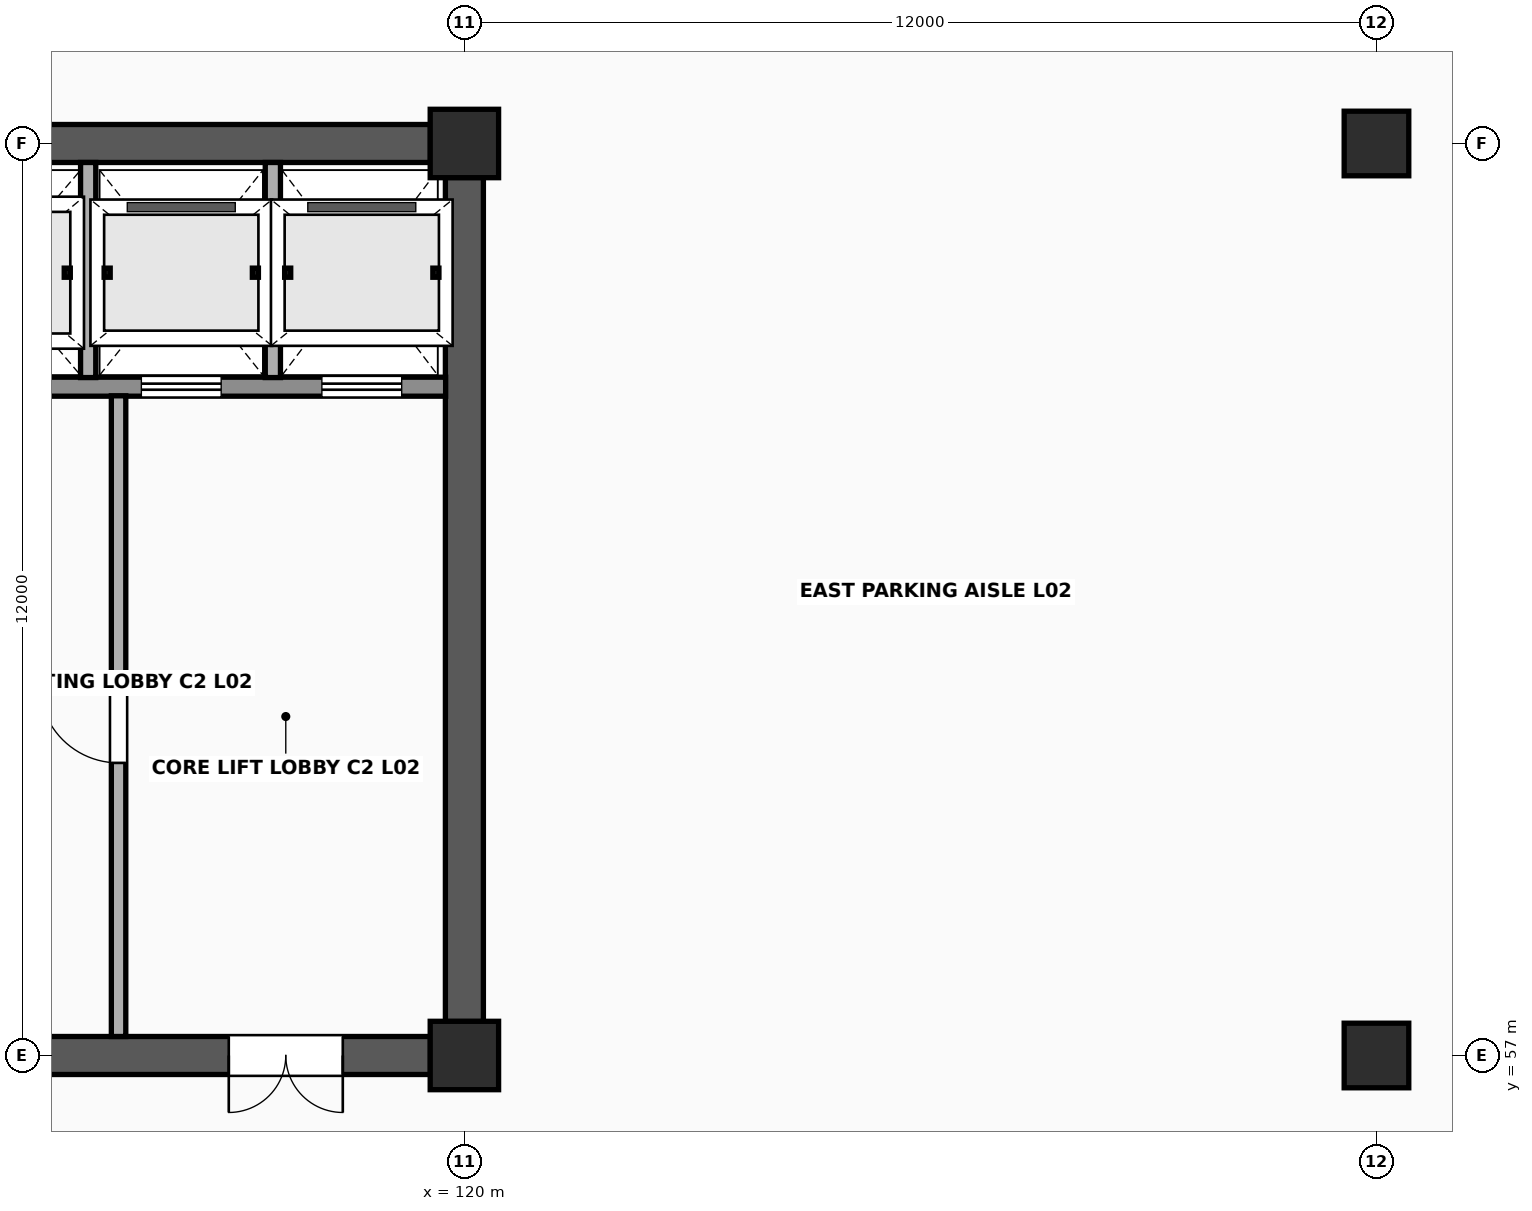
"""IFC4 building model, lengths in metres.
Left out: names, types, materials, properties, quantities, classifications, styles, units other than length and angle.
Written with IfcOpenShell. Run it as: python <this file> out.ifc"""

import sys

from ifc_helpers import new_model, si_unit, direction, frame, frame_2d, origin, origin_2d, place, context, subcontext, project, spatial, rectangle, extrude, element, fill, save


model = new_model("IFC4")
c1 = context("Model", 3, precision=1e-05, world=origin(), true_north=direction((0.0, 1.0)))
c2 = subcontext(c1, "Body", "Model", "MODEL_VIEW")
j1 = project(units=[si_unit("LENGTHUNIT", "METRE"), si_unit("PLANEANGLEUNIT", "RADIAN")], contexts=[c1])
p1 = place(None, origin())
s1 = spatial("IfcSite", under=j1, at=p1, CompositionType="ELEMENT")
p2 = place(p1, origin())
s2 = spatial("IfcBuilding", under=s1, at=p2, CompositionType="ELEMENT")
p3 = place(p2, frame((0.0, 0.0, 9.6)))
s3 = spatial("IfcBuildingStorey", under=s2, at=p3, CompositionType="ELEMENT", Elevation=9.6)
for number, where, z_axis, x_axis in (
    (1, (120.0, 57.0, 0.0), (0.0, 0.0, 1.0), (1.0, 0.0, 0.0)),
    (2, (120.0, 69.0, 0.0), (0.0, 0.0, 1.0), (1.0, 0.0, 0.0)),
):
    element("IfcColumn", number, at=place(p3, frame(where, z_axis=z_axis, x_axis=x_axis)), inside=s3, PredefinedType="COLUMN", context=c2, shape_type="SweptSolid", body=[
        extrude(rectangle(XDim=0.9, YDim=0.9, at=origin_2d()), origin(), (0.0, 0.0, 1.0), 3.8),
    ])
for number, where, z_axis, x_axis in (
    (3, (132.0, 57.0, 0.0), (0.0, 0.0, 1.0), (1.0, 0.0, 0.0)),
    (4, (132.0, 69.0, 0.0), (0.0, 0.0, 1.0), (1.0, 0.0, 0.0)),
):
    element("IfcColumn", number, at=place(p3, frame(where, z_axis=z_axis, x_axis=x_axis)), inside=s3, PredefinedType="COLUMN", context=c2, shape_type="SweptSolid", body=[
        extrude(rectangle(XDim=0.85, YDim=0.85, at=origin_2d()), origin(), (0.0, 0.0, 1.0), 3.8),
    ])
p4 = place(p3, frame((108.447, 57.0, 0.0), z_axis=(0.0, 0.0, 1.0), x_axis=(1.0, 0.0, 0.0)))
e5 = element("IfcWall", 5, at=p4, inside=s3, PredefinedType="SHEAR", context=c2, shape_type="SweptSolid", body=[
    extrude(rectangle(XDim=11.106, YDim=0.5, at=frame_2d((5.553, 0.0))), origin(), (0.0, 0.0, 1.0), 3.638),
])
p5 = place(p4, frame((4.753, 0.0, 0.0)))
e6 = element("IfcOpeningElement", 6, at=p5, cuts=e5, PredefinedType="OPENING", context=c2, shape_type="SweptSolid", body=[
    extrude(rectangle(XDim=1.2, YDim=2.2, at=frame_2d((0.6, 1.1))), frame((0.0, 0.265, 0.0), z_axis=(0.0, -1.0, 0.0), x_axis=(1.0, 0.0, 0.0)), (0.0, 0.0, 1.0), 0.53),
])
p6 = place(p4, frame((8.453, 0.0, 0.0)))
e7 = element("IfcOpeningElement", 7, at=p6, cuts=e5, PredefinedType="OPENING", context=c2, shape_type="SweptSolid", body=[
    extrude(rectangle(XDim=1.5, YDim=2.25, at=frame_2d((0.75, 1.125))), frame((0.0, 0.265, 0.0), z_axis=(0.0, -1.0, 0.0), x_axis=(1.0, 0.0, 0.0)), (0.0, 0.0, 1.0), 0.53),
])
for number, where, z_axis, x_axis in (
    (8, (108.447, 69.0, 0.0), (0.0, 0.0, 1.0), (1.0, 0.0, 0.0)),
    (9, (120.0, 57.447, 0.0), (0.0, 0.0, 1.0), (0.0, 1.0, 0.0)),
):
    element("IfcWall", number, at=place(p3, frame(where, z_axis=z_axis, x_axis=x_axis)), inside=s3, PredefinedType="SHEAR", context=c2, shape_type="SweptSolid", body=[
        extrude(rectangle(XDim=11.106, YDim=0.5, at=frame_2d((5.553, 0.0))), origin(), (0.0, 0.0, 1.0), 3.638),
    ])
p7 = place(p3, frame((112.597, 65.8, 0.0), z_axis=(0.0, 0.0, 1.0), x_axis=(1.0, 0.0, 0.0)))
e10 = element("IfcWall", 10, at=p7, inside=s3, PredefinedType="SOLIDWALL", context=c2, shape_type="SweptSolid", body=[
    extrude(rectangle(XDim=7.156, YDim=0.25, at=frame_2d((3.578, 0.0))), origin(), (0.0, 0.0, 1.0), 3.638),
])
p8 = place(p7, frame((0.653, 0.0, 0.0)))
e11 = element("IfcOpeningElement", 11, at=p8, cuts=e10, PredefinedType="OPENING", context=c2, shape_type="SweptSolid", body=[
    extrude(rectangle(XDim=1.1, YDim=2.24, at=frame_2d((0.55, 1.12))), frame((0.0, 0.14, 0.0), z_axis=(0.0, -1.0, 0.0), x_axis=(1.0, 0.0, 0.0)), (0.0, 0.0, 1.0), 0.28),
])
p9 = place(p7, frame((3.153, 0.0, 0.0)))
e12 = element("IfcOpeningElement", 12, at=p9, cuts=e10, PredefinedType="OPENING", context=c2, shape_type="SweptSolid", body=[
    extrude(rectangle(XDim=1.05, YDim=2.2, at=frame_2d((0.525, 1.1))), frame((0.0, 0.14, 0.0), z_axis=(0.0, -1.0, 0.0), x_axis=(1.0, 0.0, 0.0)), (0.0, 0.0, 1.0), 0.28),
])
p10 = place(p7, frame((5.528, 0.0, 0.0)))
e13 = element("IfcOpeningElement", 13, at=p10, cuts=e10, PredefinedType="OPENING", context=c2, shape_type="SweptSolid", body=[
    extrude(rectangle(XDim=1.05, YDim=2.2, at=frame_2d((0.525, 1.1))), frame((0.0, 0.14, 0.0), z_axis=(0.0, -1.0, 0.0), x_axis=(1.0, 0.0, 0.0)), (0.0, 0.0, 1.0), 0.28),
])
for number, where, z_axis, x_axis in (
    (14, (115.05, 65.92, 0.0), (0.0, 0.0, 1.0), (0.0, 1.0, 0.0)),
    (15, (117.48, 65.92, 0.0), (0.0, 0.0, 1.0), (0.0, 1.0, 0.0)),
):
    element("IfcWall", number, at=place(p3, frame(where, z_axis=z_axis, x_axis=x_axis)), inside=s3, PredefinedType="SOLIDWALL", context=c2, shape_type="SweptSolid", body=[
        extrude(rectangle(XDim=2.83, YDim=0.2, at=frame_2d((1.415, 0.0))), origin(), (0.0, 0.0, 1.0), 3.628),
    ])
p11 = place(p3, frame((115.45, 57.25, 0.0), z_axis=(0.0, 0.0, 1.0), x_axis=(0.0, 1.0, 0.0)))
e16 = element("IfcWall", 16, at=p11, inside=s3, PredefinedType="SOLIDWALL", context=c2, shape_type="SweptSolid", body=[
    extrude(rectangle(XDim=8.43, YDim=0.19, at=frame_2d((4.215, 0.0))), origin(), (0.0, 0.0, 1.0), 3.628),
])
p12 = place(p11, frame((3.6, 0.0, 0.0)))
e17 = element("IfcOpeningElement", 17, at=p12, cuts=e16, PredefinedType="OPENING", context=c2, shape_type="SweptSolid", body=[
    extrude(rectangle(XDim=1.04, YDim=2.18, at=frame_2d((0.52, 1.09))), frame((0.0, 0.11, 0.0), z_axis=(0.0, -1.0, 0.0), x_axis=(1.0, 0.0, 0.0)), (0.0, 0.0, 1.0), 0.22),
])
p13 = place(p12, origin())
e18 = element("IfcDoor", 18, at=p13, inside=s3, OperationType="SINGLE_SWING_RIGHT", PredefinedType="DOOR", context=c2, shape_type="SweptSolid", body=[
    extrude(rectangle(XDim=1.04, YDim=2.18, at=frame_2d((0.52, 1.09))), frame((0.0, 0.025, 0.0), z_axis=(0.0, -1.0, 0.0), x_axis=(1.0, 0.0, 0.0)), (0.0, 0.0, 1.0), 0.05),
])
fill(e17, e18)
p14 = place(p6, origin())
e19 = element("IfcDoor", 19, at=p14, inside=s3, OperationType="DOUBLE_DOOR_SINGLE_SWING", PredefinedType="DOOR", context=c2, shape_type="SweptSolid", body=[
    extrude(rectangle(XDim=1.5, YDim=2.25, at=frame_2d((0.75, 1.125))), frame((0.0, 0.025, 0.0), z_axis=(0.0, -1.0, 0.0), x_axis=(1.0, 0.0, 0.0)), (0.0, 0.0, 1.0), 0.05),
])
fill(e7, e19)
p15 = place(p9, origin())
e20 = element("IfcDoor", 20, at=p15, inside=s3, OperationType="SLIDING_TO_LEFT", PredefinedType="USERDEFINED", context=c2, shape_type="SweptSolid", body=[
    extrude(rectangle(XDim=1.05, YDim=2.2, at=frame_2d((0.525, 1.1))), frame((0.0, 0.025, 0.0), z_axis=(0.0, -1.0, 0.0), x_axis=(1.0, 0.0, 0.0)), (0.0, 0.0, 1.0), 0.05),
])
fill(e12, e20)
p16 = place(p10, origin())
e21 = element("IfcDoor", 21, at=p16, inside=s3, OperationType="SLIDING_TO_LEFT", PredefinedType="USERDEFINED", context=c2, shape_type="SweptSolid", body=[
    extrude(rectangle(XDim=1.05, YDim=2.2, at=frame_2d((0.525, 1.1))), frame((0.0, 0.025, 0.0), z_axis=(0.0, -1.0, 0.0), x_axis=(1.0, 0.0, 0.0)), (0.0, 0.0, 1.0), 0.05),
])
fill(e13, e21)
save(model, sys.argv[1])
